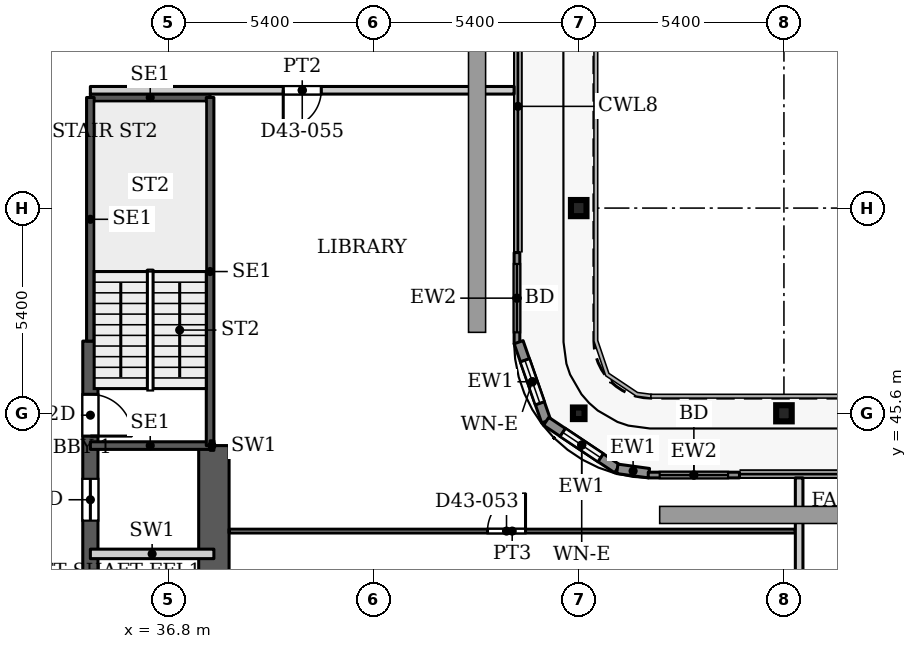
"""IFC4 building model, lengths in metres.
Left out: names, types, materials, properties, quantities, classifications, styles, units other than length and angle.
Written with IfcOpenShell. Run it as: python <this file> out.ifc"""

import sys

from ifc_helpers import new_model, si_unit, direction, frame, frame_2d, origin, origin_2d, place, context, subcontext, project, spatial, rectangle, hollow_rectangle, i_section, extrude, source, transform, mapped, element, fill, save


model = new_model("IFC4")
c1 = context("Model", 3, precision=1e-05, world=origin(), true_north=direction((0.0, 1.0)))
c2 = subcontext(c1, "Body", "Model", "MODEL_VIEW")
j1 = project(units=[si_unit("LENGTHUNIT", "METRE"), si_unit("PLANEANGLEUNIT", "RADIAN")], contexts=[c1])
p1 = place(None, origin())
s1 = spatial("IfcSite", under=j1, at=p1, CompositionType="ELEMENT")
p2 = place(p1, origin())
s2 = spatial("IfcBuilding", under=s1, at=p2, CompositionType="ELEMENT")
p3 = place(p2, frame((0.0, 0.0, 191.6)))
s3 = spatial("IfcBuildingStorey", under=s2, at=p3, CompositionType="ELEMENT", Elevation=191.6)
for number, where, z_axis, x_axis in (
    (1, (53.0, 45.6, 0.0), (0.0, 0.0, 1.0), (1.0, 0.0, 0.0)),
    (2, (47.6, 51.0, 0.0), (0.0, 0.0, 1.0), (1.0, 0.0, 0.0)),
):
    element("IfcColumn", number, at=place(p3, frame(where, z_axis=z_axis, x_axis=x_axis)), inside=s3, PredefinedType="COLUMN", context=c2, shape_type="SweptSolid", body=[
        extrude(i_section(OverallWidth=0.409, OverallDepth=0.425, WebThickness=0.033, FlangeThickness=0.052, FilletRadius=0.013, at=origin_2d()), origin(), (0.0, 0.0, 1.0), 3.9),
    ])
p4 = place(p3, frame((47.6, 45.6, 0.0), z_axis=(0.0, 0.0, 1.0), x_axis=(1.0, 0.0, 0.0)))
e3 = element("IfcColumn", 3, at=p4, inside=s3, PredefinedType="COLUMN", context=c2, shape_type="SweptSolid", body=[
    extrude(hollow_rectangle(XDim=0.305, YDim=0.305, WallThickness=0.016, InnerFilletRadius=0.016, OuterFilletRadius=0.032, at=origin_2d()), origin(), (0.0, 0.0, 1.0), 3.9),
])
p5 = place(p3, frame((34.75, 29.05, 0.0), z_axis=(0.0, 0.0, 1.0), x_axis=(0.0, 1.0, 0.0)))
e4 = element("IfcWall", 4, at=p5, inside=s3, PredefinedType="SHEAR", context=c2, shape_type="SweptSolid", body=[
    extrude(rectangle(XDim=18.45, YDim=0.4, at=frame_2d((9.225, 0.0))), origin(), (0.0, 0.0, 1.0), 3.9),
])
p6 = place(p5, frame((8.025, 0.0, 0.0)))
e5 = element("IfcOpeningElement", 5, at=p6, cuts=e4, PredefinedType="OPENING", context=c2, shape_type="SweptSolid", body=[
    extrude(rectangle(XDim=1.1, YDim=2.2, at=frame_2d((0.55, 1.1))), frame((0.0, 0.21, 0.0), z_axis=(0.0, -1.0, 0.0), x_axis=(1.0, 0.0, 0.0)), (0.0, 0.0, 1.0), 0.42),
])
p7 = place(p5, frame((10.875, 0.0, 0.0)))
e6 = element("IfcOpeningElement", 6, at=p7, cuts=e4, PredefinedType="OPENING", context=c2, shape_type="SweptSolid", body=[
    extrude(rectangle(XDim=1.1, YDim=2.2, at=frame_2d((0.55, 1.1))), frame((0.0, 0.21, 0.0), z_axis=(0.0, -1.0, 0.0), x_axis=(1.0, 0.0, 0.0)), (0.0, 0.0, 1.0), 0.42),
])
p8 = place(p5, frame((13.725, 0.0, 0.0)))
e7 = element("IfcOpeningElement", 7, at=p8, cuts=e4, PredefinedType="OPENING", context=c2, shape_type="SweptSolid", body=[
    extrude(rectangle(XDim=1.1, YDim=2.2, at=frame_2d((0.55, 1.1))), frame((0.0, 0.21, 0.0), z_axis=(0.0, -1.0, 0.0), x_axis=(1.0, 0.0, 0.0)), (0.0, 0.0, 1.0), 0.42),
])
p9 = place(p5, frame((15.95, 0.0, 0.0)))
e8 = element("IfcOpeningElement", 8, at=p9, cuts=e4, PredefinedType="OPENING", context=c2, shape_type="SweptSolid", body=[
    extrude(rectangle(XDim=1.1, YDim=2.2, at=frame_2d((0.55, 1.1))), frame((0.0, 0.21, 0.0), z_axis=(0.0, -1.0, 0.0), x_axis=(1.0, 0.0, 0.0)), (0.0, 0.0, 1.0), 0.42),
])
p10 = place(p3, frame((38.0, 36.2, 0.0), z_axis=(0.0, 0.0, 1.0), x_axis=(0.0, 1.0, 0.0)))
e9 = element("IfcWall", 9, at=p10, inside=s3, PredefinedType="SHEAR", context=c2, shape_type="SweptSolid", body=[
    extrude(rectangle(XDim=8.55, YDim=0.8, at=frame_2d((4.275, 0.0))), origin(), (0.0, 0.0, 1.0), 3.9),
])
p11 = place(p3, frame((45.975, 49.83, 0.0), z_axis=(0.0, 0.0, 1.0), x_axis=(0.0, -1.0, 0.0)))
e10 = element("IfcWall", 10, at=p11, inside=s3, PredefinedType="SOLIDWALL", context=c2, shape_type="SweptSolid", body=[
    extrude(rectangle(XDim=2.4, YDim=0.15, at=frame_2d((1.2, 0.0))), origin(), (0.0, 0.0, 1.0), 3.75),
])
p12 = place(p11, frame((0.3, 0.0, 0.0)))
e11 = element("IfcOpeningElement", 11, at=p12, cuts=e10, PredefinedType="OPENING", context=c2, shape_type="SweptSolid", body=[
    extrude(rectangle(XDim=1.8, YDim=2.4, at=frame_2d((0.9, 1.2))), frame((0.0, 0.085, 0.0), z_axis=(0.0, -1.0, 0.0), x_axis=(1.0, 0.0, 0.0)), (0.0, 0.0, 1.0), 0.17),
])
p13 = place(p3, frame((46.018, 47.471, 0.0), z_axis=(0.0, 0.0, 1.0), x_axis=(0.328791208903, -0.944402637093, 0.0)))
e12 = element("IfcWall", 12, at=p13, inside=s3, PredefinedType="SOLIDWALL", context=c2, shape_type="SweptSolid", body=[
    extrude(rectangle(XDim=2.205, YDim=0.25, at=frame_2d((1.102, 0.0))), origin(), (0.0, 0.0, 1.0), 3.75),
])
p14 = place(p13, frame((0.503, 0.0, 0.6)))
e13 = element("IfcOpeningElement", 13, at=p14, cuts=e12, PredefinedType="OPENING", context=c2, shape_type="SweptSolid", body=[
    extrude(rectangle(XDim=1.2, YDim=2.1, at=frame_2d((0.6, 1.05))), frame((0.0, 0.135, 0.0), z_axis=(0.0, -1.0, 0.0), x_axis=(1.0, 0.0, 0.0)), (0.0, 0.0, 1.0), 0.27),
])
p15 = place(p3, frame((46.743, 45.389, 0.0), z_axis=(0.0, 0.0, 1.0), x_axis=(0.831449265529, -0.555600682912, 0.0)))
e14 = element("IfcWall", 14, at=p15, inside=s3, PredefinedType="SOLIDWALL", context=c2, shape_type="SweptSolid", body=[
    extrude(rectangle(XDim=2.251, YDim=0.25, at=frame_2d((1.126, 0.0))), origin(), (0.0, 0.0, 1.0), 3.75),
])
p16 = place(p15, frame((0.525, 0.0, 0.6)))
e15 = element("IfcOpeningElement", 15, at=p16, cuts=e14, PredefinedType="OPENING", context=c2, shape_type="SweptSolid", body=[
    extrude(rectangle(XDim=1.2, YDim=2.1, at=frame_2d((0.6, 1.05))), frame((0.0, 0.135, 0.0), z_axis=(0.0, -1.0, 0.0), x_axis=(1.0, 0.0, 0.0)), (0.0, 0.0, 1.0), 0.27),
])
p17 = place(p3, frame((48.615, 44.138, 0.0), z_axis=(0.0, 0.0, 1.0), x_axis=(0.990741504246, -0.135761819977, 0.0)))
e16 = element("IfcWall", 16, at=p17, inside=s3, PredefinedType="SOLIDWALL", context=c2, shape_type="SweptSolid", body=[
    extrude(rectangle(XDim=0.84, YDim=0.25, at=frame_2d((0.42, 0.0))), origin(), (0.0, 0.0, 1.0), 3.75),
])
p18 = place(p3, frame((49.43, 43.975, 0.0), z_axis=(0.0, 0.0, 1.0), x_axis=(1.0, 0.0, 0.0)))
e17 = element("IfcWall", 17, at=p18, inside=s3, PredefinedType="SOLIDWALL", context=c2, shape_type="SweptSolid", body=[
    extrude(rectangle(XDim=2.4, YDim=0.15, at=frame_2d((1.2, 0.0))), origin(), (0.0, 0.0, 1.0), 3.75),
])
p19 = place(p18, frame((0.3, 0.0, 0.0)))
e18 = element("IfcOpeningElement", 18, at=p19, cuts=e17, PredefinedType="OPENING", context=c2, shape_type="SweptSolid", body=[
    extrude(rectangle(XDim=1.8, YDim=2.4, at=frame_2d((0.9, 1.2))), frame((0.0, 0.085, 0.0), z_axis=(0.0, -1.0, 0.0), x_axis=(1.0, 0.0, 0.0)), (0.0, 0.0, 1.0), 0.17),
])
for number, where, z_axis, x_axis in (
    (19, (34.75, 44.75, 0.0), (0.0, 0.0, 1.0), (1.0, 0.0, 0.0)),
    (20, (34.75, 53.91, 0.0), (0.0, 0.0, 1.0), (1.0, 0.0, 0.0)),
):
    element("IfcWall", number, at=place(p3, frame(where, z_axis=z_axis, x_axis=x_axis)), inside=s3, PredefinedType="SHEAR", context=c2, shape_type="SweptSolid", body=[
        extrude(rectangle(XDim=3.15, YDim=0.2, at=frame_2d((1.575, 0.0))), origin(), (0.0, 0.0, 1.0), 3.9),
    ])
p20 = place(p3, frame((34.75, 47.5, 0.0), z_axis=(0.0, 0.0, 1.0), x_axis=(0.0, 1.0, 0.0)))
e21 = element("IfcWall", 21, at=p20, inside=s3, PredefinedType="SHEAR", context=c2, shape_type="SweptSolid", body=[
    extrude(rectangle(XDim=6.41, YDim=0.2, at=frame_2d((3.205, 0.0))), origin(), (0.0, 0.0, 1.0), 3.9),
])
p21 = place(p3, frame((37.9, 44.75, 0.0), z_axis=(0.0, 0.0, 1.0), x_axis=(0.0, 1.0, 0.0)))
e22 = element("IfcWall", 22, at=p21, inside=s3, PredefinedType="SHEAR", context=c2, shape_type="SweptSolid", body=[
    extrude(rectangle(XDim=9.16, YDim=0.2, at=frame_2d((4.58, 0.0))), origin(), (0.0, 0.0, 1.0), 3.9),
])
p22 = place(p3, frame((34.75, 41.9, 0.0), z_axis=(0.0, 0.0, 1.0), x_axis=(1.0, 0.0, 0.0)))
e23 = element("IfcWall", 23, at=p22, inside=s3, PredefinedType="PARTITIONING", context=c2, shape_type="SweptSolid", body=[
    extrude(rectangle(XDim=3.25, YDim=0.25, at=frame_2d((1.625, 0.0))), origin(), (0.0, 0.0, 1.0), 3.9),
])
p23 = place(p3, frame((37.9, 44.75, 0.0), z_axis=(0.0, 0.0, 1.0), x_axis=(1.0, 0.0, 0.0)))
e24 = element("IfcWall", 24, at=p23, inside=s3, PredefinedType="PARTITIONING", context=c2, shape_type="SweptSolid", body=[
    extrude(rectangle(XDim=0.1, YDim=0.25, at=frame_2d((0.05, 0.0))), origin(), (0.0, 0.0, 1.0), 3.9),
])
p24 = place(p3, frame((34.75, 54.1, 0.0), z_axis=(0.0, 0.0, 1.0), x_axis=(1.0, 0.0, 0.0)))
e25 = element("IfcWall", 25, at=p24, inside=s3, PredefinedType="PARTITIONING", context=c2, shape_type="SweptSolid", body=[
    extrude(rectangle(XDim=11.15, YDim=0.2, at=frame_2d((5.575, 0.0))), origin(), (0.0, 0.0, 1.0), 3.6),
])
p25 = place(p24, frame((5.075, 0.0, 0.0)))
e26 = element("IfcOpeningElement", 26, at=p25, cuts=e25, PredefinedType="OPENING", context=c2, shape_type="SweptSolid", body=[
    extrude(rectangle(XDim=1.0, YDim=2.1, at=frame_2d((0.5, 1.05))), frame((0.0, 0.11, 0.0), z_axis=(0.0, -1.0, 0.0), x_axis=(1.0, 0.0, 0.0)), (0.0, 0.0, 1.0), 0.22),
])
p26 = place(p3, frame((38.399, 42.5, 0.0), z_axis=(0.0, 0.0, 1.0), x_axis=(1.0, 0.0, 0.0)))
e27 = element("IfcWall", 27, at=p26, inside=s3, PredefinedType="PARTITIONING", context=c2, shape_type="SweptSolid", body=[
    extrude(rectangle(XDim=14.901, YDim=0.1, at=frame_2d((7.451, 0.0))), origin(), (0.0, 0.0, 1.0), 3.6),
])
p27 = place(p26, frame((6.801, 0.0, 0.0)))
e28 = element("IfcOpeningElement", 28, at=p27, cuts=e27, PredefinedType="OPENING", context=c2, shape_type="SweptSolid", body=[
    extrude(rectangle(XDim=1.0, YDim=2.1, at=frame_2d((0.5, 1.05))), frame((0.0, 0.06, 0.0), z_axis=(0.0, -1.0, 0.0), x_axis=(1.0, 0.0, 0.0)), (0.0, 0.0, 1.0), 0.12),
])
p28 = place(p3, frame((53.4, 36.199, 0.0), z_axis=(0.0, 0.0, 1.0), x_axis=(0.0, 1.0, 0.0)))
e29 = element("IfcWall", 29, at=p28, inside=s3, PredefinedType="PARTITIONING", context=c2, shape_type="SweptSolid", body=[
    extrude(rectangle(XDim=7.701, YDim=0.2, at=frame_2d((3.851, 0.0))), origin(), (0.0, 0.0, 1.0), 3.6),
])
m1 = source(origin(), c2, "Body", "SweptSolid", [
    extrude(rectangle(XDim=1.8, YDim=2.4, at=frame_2d((0.9, 1.2))), frame((0.0, 0.025, 0.0), z_axis=(0.0, -1.0, 0.0), x_axis=(1.0, 0.0, 0.0)), (0.0, 0.0, 1.0), 0.05),
])
p29 = place(p12, origin())
e30 = element("IfcDoor", 30, at=p29, inside=s3, OperationType="SLIDING_TO_LEFT", PredefinedType="DOOR", context=c2, shape_type="MappedRepresentation", body=[
    mapped(m1, transform((0.0, 0.0, 0.0), x_axis=(1.0, 0.0, 0.0), y_axis=(0.0, 1.0, 0.0), z_axis=(0.0, 0.0, 1.0), scale=1.0)),
])
fill(e11, e30)
m2 = source(origin(), c2, "Body", "SweptSolid", [
    extrude(rectangle(XDim=1.2, YDim=2.1, at=frame_2d((0.6, 1.05))), frame((0.0, 0.03, 0.0), z_axis=(0.0, -1.0, 0.0), x_axis=(1.0, 0.0, 0.0)), (0.0, 0.0, 1.0), 0.06),
])
p30 = place(p14, origin())
e31 = element("IfcWindow", 31, at=p30, inside=s3, PartitioningType="SINGLE_PANEL", PredefinedType="WINDOW", context=c2, shape_type="MappedRepresentation", body=[
    mapped(m2, transform((0.0, 0.0, 0.0), x_axis=(1.0, 0.0, 0.0), y_axis=(0.0, 1.0, 0.0), z_axis=(0.0, 0.0, 1.0), scale=1.0)),
])
fill(e13, e31)
p31 = place(p16, origin())
e32 = element("IfcWindow", 32, at=p31, inside=s3, PartitioningType="SINGLE_PANEL", PredefinedType="WINDOW", context=c2, shape_type="MappedRepresentation", body=[
    mapped(m2, transform((0.0, 0.0, 0.0), x_axis=(1.0, 0.0, 0.0), y_axis=(0.0, 1.0, 0.0), z_axis=(0.0, 0.0, 1.0), scale=1.0)),
])
fill(e15, e32)
p32 = place(p19, origin())
e33 = element("IfcDoor", 33, at=p32, inside=s3, OperationType="SLIDING_TO_LEFT", PredefinedType="DOOR", context=c2, shape_type="MappedRepresentation", body=[
    mapped(m1, transform((0.0, 0.0, 0.0), x_axis=(1.0, 0.0, 0.0), y_axis=(0.0, 1.0, 0.0), z_axis=(0.0, 0.0, 1.0), scale=1.0)),
])
fill(e18, e33)
m3 = source(origin(), c2, "Body", "SweptSolid", [
    extrude(rectangle(XDim=1.1, YDim=2.2, at=frame_2d((0.55, 1.1))), frame((0.0, 0.025, 0.0), z_axis=(0.0, -1.0, 0.0), x_axis=(1.0, 0.0, 0.0)), (0.0, 0.0, 1.0), 0.05),
])
p33 = place(p8, origin())
e34 = element("IfcDoor", 34, at=p33, inside=s3, OperationType="SLIDING_TO_LEFT", PredefinedType="DOOR", context=c2, shape_type="MappedRepresentation", body=[
    mapped(m3, transform((0.0, 0.0, 0.0), x_axis=(1.0, 0.0, 0.0), y_axis=(0.0, 1.0, 0.0), z_axis=(0.0, 0.0, 1.0), scale=1.0)),
])
fill(e7, e34)
m4 = source(origin(), c2, "Body", "SweptSolid", [
    extrude(rectangle(XDim=1.1, YDim=2.2, at=frame_2d((0.55, 1.1))), frame((0.0, 0.025, 0.0), z_axis=(0.0, -1.0, 0.0), x_axis=(1.0, 0.0, 0.0)), (0.0, 0.0, 1.0), 0.05),
])
p34 = place(p9, origin())
e35 = element("IfcDoor", 35, at=p34, inside=s3, OperationType="SINGLE_SWING_RIGHT", PredefinedType="DOOR", context=c2, shape_type="MappedRepresentation", body=[
    mapped(m4, transform((0.0, 0.0, 0.0), x_axis=(1.0, 0.0, 0.0), y_axis=(0.0, 1.0, 0.0), z_axis=(0.0, 0.0, 1.0), scale=1.0)),
])
fill(e8, e35)
m5 = source(origin(), c2, "Body", "SweptSolid", [
    extrude(rectangle(XDim=1.0, YDim=2.1, at=frame_2d((0.5, 1.05))), frame((0.0, 0.025, 0.0), z_axis=(0.0, -1.0, 0.0), x_axis=(1.0, 0.0, 0.0)), (0.0, 0.0, 1.0), 0.05),
])
p35 = place(p27, origin())
e36 = element("IfcDoor", 36, at=p35, inside=s3, OperationType="SINGLE_SWING_LEFT", PredefinedType="DOOR", context=c2, shape_type="MappedRepresentation", body=[
    mapped(m5, transform((0.0, 0.0, 0.0), x_axis=(1.0, 0.0, 0.0), y_axis=(0.0, 1.0, 0.0), z_axis=(0.0, 0.0, 1.0), scale=1.0)),
])
fill(e28, e36)
m6 = source(origin(), c2, "Body", "SweptSolid", [
    extrude(rectangle(XDim=1.0, YDim=2.1, at=frame_2d((0.5, 1.05))), frame((0.0, 0.025, 0.0), z_axis=(0.0, -1.0, 0.0), x_axis=(1.0, 0.0, 0.0)), (0.0, 0.0, 1.0), 0.05),
])
p36 = place(p25, origin())
e37 = element("IfcDoor", 37, at=p36, inside=s3, OperationType="SINGLE_SWING_RIGHT", PredefinedType="DOOR", context=c2, shape_type="MappedRepresentation", body=[
    mapped(m6, transform((0.0, 0.0, 0.0), x_axis=(1.0, 0.0, 0.0), y_axis=(0.0, 1.0, 0.0), z_axis=(0.0, 0.0, 1.0), scale=1.0)),
])
fill(e26, e37)
save(model, sys.argv[1])
